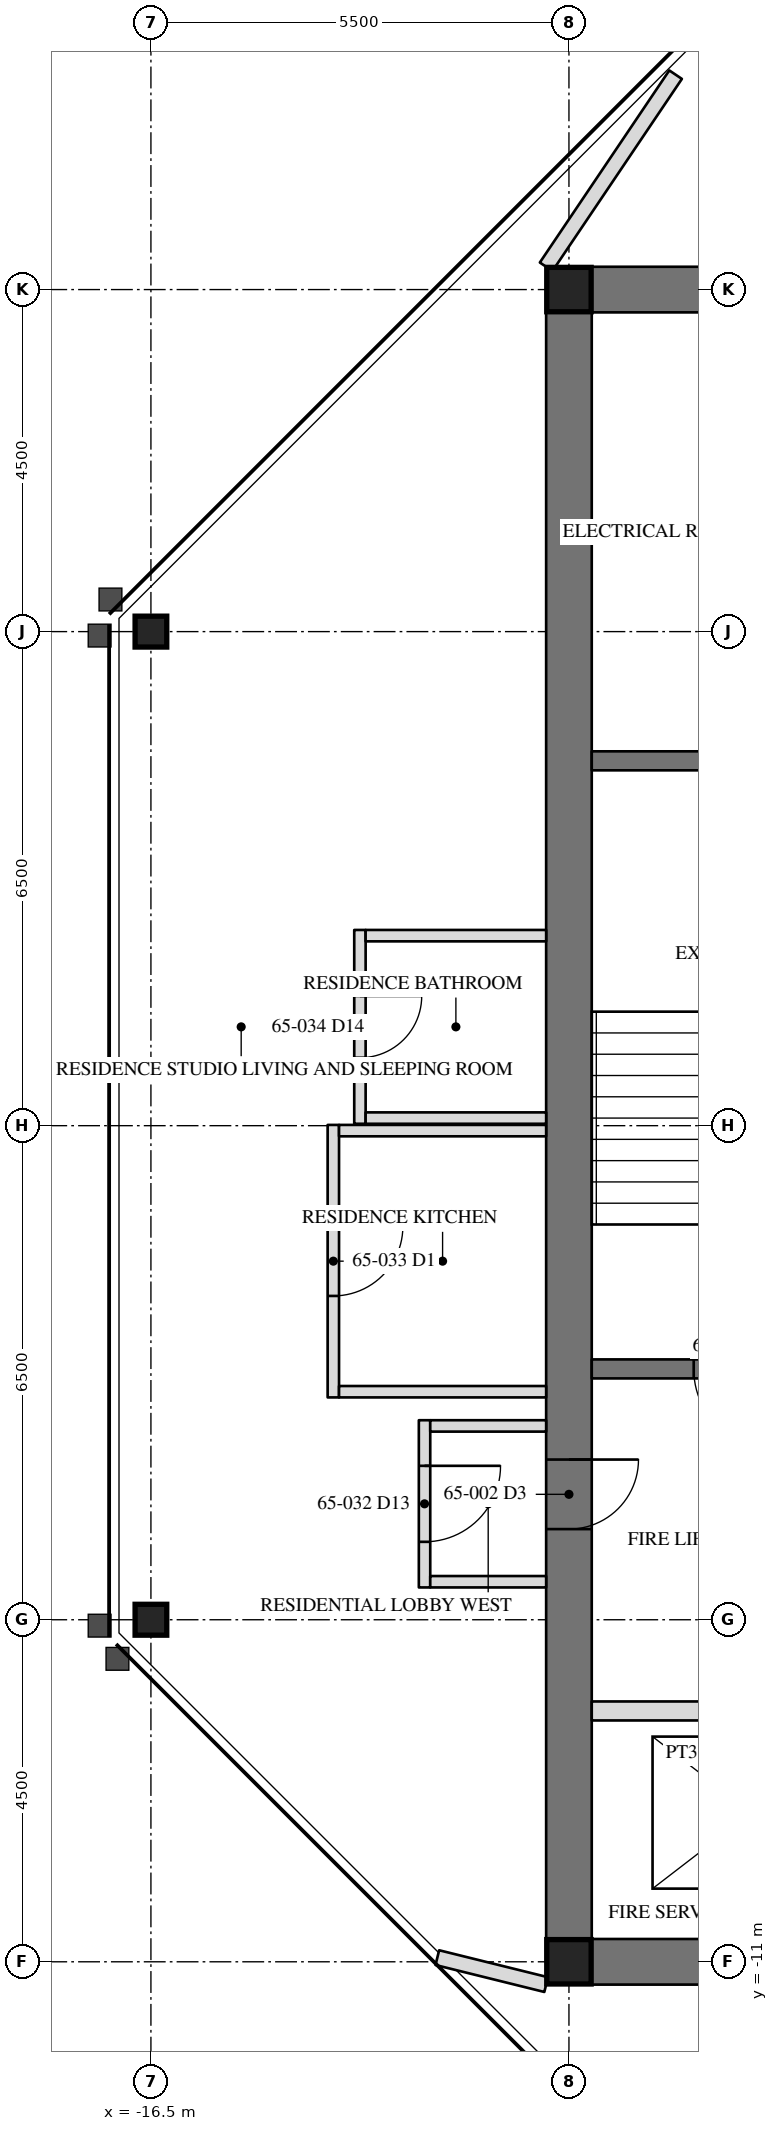
"""IFC4 building model, lengths in metres.
Left out: names, types, materials, properties, quantities, classifications, styles, units other than length and angle.
Written with IfcOpenShell. Run it as: python <this file> out.ifc"""

import sys

from ifc_helpers import new_model, si_unit, direction, frame, frame_2d, origin, origin_2d, place, context, subcontext, project, spatial, rectangle, hollow_rectangle, i_section, extrude, element, fill, save


model = new_model("IFC4")
c1 = context("Model", 3, precision=1e-05, world=origin(), true_north=direction((0.0, 1.0)))
c2 = subcontext(c1, "Body", "Model", "MODEL_VIEW")
j1 = project(units=[si_unit("LENGTHUNIT", "METRE"), si_unit("PLANEANGLEUNIT", "RADIAN")], contexts=[c1])
p1 = place(None, origin())
s1 = spatial("IfcSite", under=j1, at=p1, CompositionType="ELEMENT")
p2 = place(p1, origin())
s2 = spatial("IfcBuilding", under=s1, at=p2, CompositionType="ELEMENT")
p3 = place(p2, frame((0.0, 0.0, 266.8)))
s3 = spatial("IfcBuildingStorey", under=s2, at=p3, CompositionType="ELEMENT", Elevation=266.8)
for number, where, z_axis, x_axis in (
    (1, (-16.5, -6.5, 0.0), (0.0, 0.0, 1.0), (0.0, 1.0, 0.0)),
    (2, (-16.5, 6.5, 0.0), (0.0, 0.0, 1.0), (0.0, 1.0, 0.0)),
):
    element("IfcColumn", number, at=place(p3, frame(where, z_axis=z_axis, x_axis=x_axis)), inside=s3, PredefinedType="COLUMN", context=c2, shape_type="SweptSolid", body=[
        extrude(i_section(OverallWidth=0.406, OverallDepth=0.417, WebThickness=0.03, FlangeThickness=0.048, at=origin_2d()), origin(), (0.0, 0.0, 1.0), 3.6),
    ])
p4 = place(p3, frame((-11.0, 11.0, 0.0), z_axis=(0.0, 0.0, 1.0), x_axis=(0.0, -1.0, 0.0)))
e3 = element("IfcWall", 3, at=p4, inside=s3, PredefinedType="SHEAR", context=c2, shape_type="SweptSolid", body=[
    extrude(rectangle(XDim=22.0, YDim=0.6, at=frame_2d((11.0, 0.0))), origin(), (0.0, 0.0, 1.0), 3.6),
])
p5 = place(p4, frame((15.393, 0.0, 0.0)))
e4 = element("IfcOpeningElement", 4, at=p5, cuts=e3, PredefinedType="OPENING", context=c2, shape_type="SweptSolid", body=[
    extrude(rectangle(XDim=0.915, YDim=2.134, at=frame_2d((0.458, 1.067))), frame((0.0, 0.31, 0.0), z_axis=(0.0, -1.0, 0.0), x_axis=(1.0, 0.0, 0.0)), (0.0, 0.0, 1.0), 0.62),
])
for number, where, z_axis, x_axis in (
    (5, (-6.5, 11.0, 0.0), (0.0, 0.0, 1.0), (-1.0, 0.0, 0.0)),
    (6, (-11.0, -11.0, 0.0), (0.0, 0.0, 1.0), (1.0, 0.0, 0.0)),
):
    element("IfcWall", number, at=place(p3, frame(where, z_axis=z_axis, x_axis=x_axis)), inside=s3, PredefinedType="SHEAR", context=c2, shape_type="SweptSolid", body=[
        extrude(rectangle(XDim=4.5, YDim=0.6, at=frame_2d((2.25, 0.0))), origin(), (0.0, 0.0, 1.0), 3.6),
    ])
for number, where, z_axis, x_axis in (
    (7, (-11.0, 11.0, 0.0), (0.0, 0.0, 1.0), (1.0, 0.0, 0.0)),
    (8, (-11.0, -11.0, 0.0), (0.0, 0.0, 1.0), (1.0, 0.0, 0.0)),
):
    element("IfcColumn", number, at=place(p3, frame(where, z_axis=z_axis, x_axis=x_axis)), inside=s3, PredefinedType="COLUMN", context=c2, shape_type="SweptSolid", body=[
        extrude(hollow_rectangle(XDim=0.584, YDim=0.584, WallThickness=0.051, at=origin_2d()), origin(), (0.0, 0.0, 1.0), 3.6),
    ])
p6 = place(p3, frame((-6.95, 4.8, 0.0), z_axis=(0.0, 0.0, 1.0), x_axis=(-1.0, 0.0, 0.0)))
e9 = element("IfcWall", 9, at=p6, inside=s3, PredefinedType="SOLIDWALL", context=c2, shape_type="SweptSolid", body=[
    extrude(rectangle(XDim=3.75, YDim=0.25, at=frame_2d((1.875, 0.0))), origin(), (0.0, 0.0, 1.0), 3.41),
])
p7 = place(p3, frame((-6.95, -3.2, 0.0), z_axis=(0.0, 0.0, 1.0), x_axis=(-1.0, 0.0, 0.0)))
e10 = element("IfcWall", 10, at=p7, inside=s3, PredefinedType="SOLIDWALL", context=c2, shape_type="SweptSolid", body=[
    extrude(rectangle(XDim=3.75, YDim=0.25, at=frame_2d((1.875, 0.0))), origin(), (0.0, 0.0, 1.0), 3.41),
])
p8 = place(p7, frame((1.342, 0.0, 0.0)))
e11 = element("IfcOpeningElement", 11, at=p8, cuts=e10, PredefinedType="OPENING", context=c2, shape_type="SweptSolid", body=[
    extrude(rectangle(XDim=1.067, YDim=2.134, at=frame_2d((0.533, 1.067))), frame((0.0, 0.135, 0.0), z_axis=(0.0, -1.0, 0.0), x_axis=(1.0, 0.0, 0.0)), (0.0, 0.0, 1.0), 0.27),
])
p9 = place(p3, frame((-6.95, -7.7, 0.0), z_axis=(0.0, 0.0, 1.0), x_axis=(-1.0, 0.0, 0.0)))
e12 = element("IfcWall", 12, at=p9, inside=s3, PredefinedType="PARTITIONING", context=c2, shape_type="SweptSolid", body=[
    extrude(rectangle(XDim=3.75, YDim=0.25, at=frame_2d((1.875, 0.0))), origin(), (0.0, 0.0, 1.0), 3.41),
])
p10 = place(p9, frame((0.45, 0.0, 0.0)))
e13 = element("IfcOpeningElement", 13, at=p10, cuts=e12, PredefinedType="OPENING", context=c2, shape_type="SweptSolid", body=[
    extrude(rectangle(XDim=1.219, YDim=2.134, at=frame_2d((0.609, 1.067))), frame((0.0, 0.135, 0.0), z_axis=(0.0, -1.0, 0.0), x_axis=(1.0, 0.0, 0.0)), (0.0, 0.0, 1.0), 0.27),
])
p11 = place(p3, frame((-11.3, 11.3, 0.0), z_axis=(0.0, 0.0, 1.0), x_axis=(0.558834300538, 0.829279340477, 0.0)))
e14 = element("IfcWall", 14, at=p11, inside=s3, PredefinedType="PARTITIONING", context=c2, shape_type="SweptSolid", body=[
    extrude(rectangle(XDim=3.048, YDim=0.2, at=frame_2d((1.524, 0.0))), origin(), (0.0, 0.0, 1.0), 2.704),
])
p12 = place(p3, frame((-11.3, -11.3, 0.0), z_axis=(0.0, 0.0, 1.0), x_axis=(-0.970646702169, 0.24050983258, 0.0)))
e15 = element("IfcWall", 15, at=p12, inside=s3, PredefinedType="PARTITIONING", context=c2, shape_type="SweptSolid", body=[
    extrude(rectangle(XDim=1.475, YDim=0.2, at=frame_2d((0.737, 0.0))), origin(), (0.0, 0.0, 1.0), 3.41),
])
p13 = place(p3, frame((-12.9, -3.875, 0.0), z_axis=(0.0, 0.0, 1.0), x_axis=(0.0, -1.0, 0.0)))
e16 = element("IfcWall", 16, at=p13, inside=s3, PredefinedType="PARTITIONING", context=c2, shape_type="SweptSolid", body=[
    extrude(rectangle(XDim=2.2, YDim=0.15, at=frame_2d((1.1, 0.0))), origin(), (0.0, 0.0, 1.0), 3.41),
])
p14 = place(p13, frame((0.6, 0.0, 0.0)))
e17 = element("IfcOpeningElement", 17, at=p14, cuts=e16, PredefinedType="OPENING", context=c2, shape_type="SweptSolid", body=[
    extrude(rectangle(XDim=1.0, YDim=2.134, at=frame_2d((0.5, 1.067))), frame((0.0, 0.085, 0.0), z_axis=(0.0, -1.0, 0.0), x_axis=(1.0, 0.0, 0.0)), (0.0, 0.0, 1.0), 0.17),
])
for number, where, z_axis, x_axis in (
    (18, (-11.3, -3.95, 0.0), (0.0, 0.0, 1.0), (-1.0, 0.0, 0.0)),
    (19, (-11.3, -6.0, 0.0), (0.0, 0.0, 1.0), (-1.0, 0.0, 0.0)),
):
    element("IfcWall", number, at=place(p3, frame(where, z_axis=z_axis, x_axis=x_axis)), inside=s3, PredefinedType="PARTITIONING", context=c2, shape_type="SweptSolid", body=[
        extrude(rectangle(XDim=1.525, YDim=0.15, at=frame_2d((0.762, 0.0))), origin(), (0.0, 0.0, 1.0), 3.41),
    ])
p15 = place(p3, frame((-14.1, 0.01, 0.0), z_axis=(0.0, 0.0, 1.0), x_axis=(0.0, -1.0, 0.0)))
e20 = element("IfcWall", 20, at=p15, inside=s3, PredefinedType="PARTITIONING", context=c2, shape_type="SweptSolid", body=[
    extrude(rectangle(XDim=3.585, YDim=0.15, at=frame_2d((1.792, 0.0))), origin(), (0.0, 0.0, 1.0), 3.41),
])
p16 = place(p15, frame((1.335, 0.0, 0.0)))
e21 = element("IfcOpeningElement", 21, at=p16, cuts=e20, PredefinedType="OPENING", context=c2, shape_type="SweptSolid", body=[
    extrude(rectangle(XDim=0.915, YDim=2.134, at=frame_2d((0.458, 1.067))), frame((0.0, 0.085, 0.0), z_axis=(0.0, -1.0, 0.0), x_axis=(1.0, 0.0, 0.0)), (0.0, 0.0, 1.0), 0.17),
])
p17 = place(p3, frame((-11.3, -0.065, 0.0), z_axis=(0.0, 0.0, 1.0), x_axis=(-1.0, 0.0, 0.0)))
e22 = element("IfcWall", 22, at=p17, inside=s3, PredefinedType="PARTITIONING", context=c2, shape_type="SweptSolid", body=[
    extrude(rectangle(XDim=2.725, YDim=0.15, at=frame_2d((1.362, 0.0))), origin(), (0.0, 0.0, 1.0), 2.709),
])
p18 = place(p3, frame((-11.3, -3.5, 0.0), z_axis=(0.0, 0.0, 1.0), x_axis=(-1.0, 0.0, 0.0)))
e23 = element("IfcWall", 23, at=p18, inside=s3, PredefinedType="PARTITIONING", context=c2, shape_type="SweptSolid", body=[
    extrude(rectangle(XDim=2.725, YDim=0.15, at=frame_2d((1.362, 0.0))), origin(), (0.0, 0.0, 1.0), 3.41),
])
p19 = place(p3, frame((-13.75, 2.575, 0.0), z_axis=(0.0, 0.0, 1.0), x_axis=(0.0, -1.0, 0.0)))
e24 = element("IfcWall", 24, at=p19, inside=s3, PredefinedType="PARTITIONING", context=c2, shape_type="SweptSolid", body=[
    extrude(rectangle(XDim=2.55, YDim=0.15, at=frame_2d((1.275, 0.0))), origin(), (0.0, 0.0, 1.0), 3.41),
])
p20 = place(p19, frame((0.868, 0.0, 0.0)))
e25 = element("IfcOpeningElement", 25, at=p20, cuts=e24, PredefinedType="OPENING", context=c2, shape_type="SweptSolid", body=[
    extrude(rectangle(XDim=0.813, YDim=2.032, at=frame_2d((0.406, 1.016))), frame((0.0, 0.085, 0.0), z_axis=(0.0, -1.0, 0.0), x_axis=(1.0, 0.0, 0.0)), (0.0, 0.0, 1.0), 0.17),
])
p21 = place(p3, frame((-11.3, 2.5, 0.0), z_axis=(0.0, 0.0, 1.0), x_axis=(-1.0, 0.0, 0.0)))
e26 = element("IfcWall", 26, at=p21, inside=s3, PredefinedType="PARTITIONING", context=c2, shape_type="SweptSolid", body=[
    extrude(rectangle(XDim=2.375, YDim=0.15, at=frame_2d((1.188, 0.0))), origin(), (0.0, 0.0, 1.0), 3.41),
])
p22 = place(p3, frame((-11.3, 0.1, 0.0), z_axis=(0.0, 0.0, 1.0), x_axis=(-1.0, 0.0, 0.0)))
e27 = element("IfcWall", 27, at=p22, inside=s3, PredefinedType="PARTITIONING", context=c2, shape_type="SweptSolid", body=[
    extrude(rectangle(XDim=2.375, YDim=0.15, at=frame_2d((1.188, 0.0))), origin(), (0.0, 0.0, 1.0), 2.709),
])
p23 = place(p5, origin())
e28 = element("IfcDoor", 28, at=p23, inside=s3, OperationType="SINGLE_SWING_RIGHT", PredefinedType="DOOR", context=c2, shape_type="SweptSolid", body=[
    extrude(rectangle(XDim=0.915, YDim=2.134, at=frame_2d((0.458, 1.067))), frame((0.0, -0.225, 0.0), z_axis=(0.0, -1.0, 0.0), x_axis=(1.0, 0.0, 0.0)), (0.0, 0.0, 1.0), 0.05),
])
fill(e4, e28)
p24 = place(p8, origin())
e29 = element("IfcDoor", 29, at=p24, inside=s3, OperationType="SINGLE_SWING_LEFT", PredefinedType="DOOR", context=c2, shape_type="SweptSolid", body=[
    extrude(rectangle(XDim=1.067, YDim=2.134, at=frame_2d((0.533, 1.067))), frame((0.0, 0.025, 0.0), z_axis=(0.0, -1.0, 0.0), x_axis=(1.0, 0.0, 0.0)), (0.0, 0.0, 1.0), 0.05),
])
fill(e11, e29)
p25 = place(p14, origin())
e30 = element("IfcDoor", 30, at=p25, inside=s3, OperationType="SINGLE_SWING_RIGHT", PredefinedType="DOOR", context=c2, shape_type="SweptSolid", body=[
    extrude(rectangle(XDim=1.0, YDim=2.134, at=frame_2d((0.5, 1.067))), frame((0.0, 0.025, 0.0), z_axis=(0.0, -1.0, 0.0), x_axis=(1.0, 0.0, 0.0)), (0.0, 0.0, 1.0), 0.05),
])
fill(e17, e30)
p26 = place(p16, origin())
e31 = element("IfcDoor", 31, at=p26, inside=s3, OperationType="SINGLE_SWING_LEFT", PredefinedType="DOOR", context=c2, shape_type="SweptSolid", body=[
    extrude(rectangle(XDim=0.915, YDim=2.134, at=frame_2d((0.458, 1.067))), frame((0.0, 0.025, 0.0), z_axis=(0.0, -1.0, 0.0), x_axis=(1.0, 0.0, 0.0)), (0.0, 0.0, 1.0), 0.05),
])
fill(e21, e31)
p27 = place(p20, origin())
e32 = element("IfcDoor", 32, at=p27, inside=s3, OperationType="SINGLE_SWING_LEFT", PredefinedType="DOOR", context=c2, shape_type="SweptSolid", body=[
    extrude(rectangle(XDim=0.813, YDim=2.032, at=frame_2d((0.406, 1.016))), frame((0.0, 0.025, 0.0), z_axis=(0.0, -1.0, 0.0), x_axis=(1.0, 0.0, 0.0)), (0.0, 0.0, 1.0), 0.05),
])
fill(e25, e32)
save(model, sys.argv[1])
